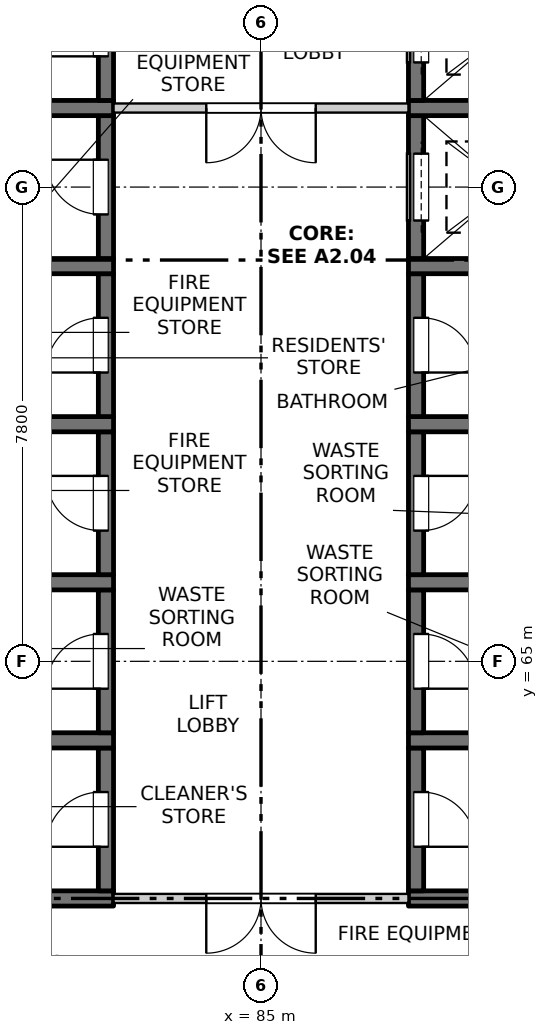
"""IFC4 building model, lengths in metres.
Left out: names, types, materials, properties, quantities, classifications, styles, units other than length and angle.
Written with IfcOpenShell. Run it as: python <this file> out.ifc"""

import sys

from ifc_helpers import new_model, si_unit, direction, frame, frame_2d, origin, place, context, subcontext, project, spatial, rectangle, extrude, element, fill, save


model = new_model("IFC4")
c1 = context("Model", 3, precision=1e-05, world=origin(), true_north=direction((0.0, 1.0)))
c2 = subcontext(c1, "Body", "Model", "MODEL_VIEW")
j1 = project(units=[si_unit("LENGTHUNIT", "METRE"), si_unit("PLANEANGLEUNIT", "RADIAN")], contexts=[c1])
p1 = place(None, origin())
s1 = spatial("IfcSite", under=j1, at=p1, CompositionType="ELEMENT")
p2 = place(p1, origin())
s2 = spatial("IfcBuilding", under=s1, at=p2, CompositionType="ELEMENT")
p3 = place(p2, frame((0.0, 0.0, 221.1)))
s3 = spatial("IfcBuildingStorey", under=s2, at=p3, CompositionType="ELEMENT", Elevation=221.1)
p4 = place(p3, frame((79.575, 61.1, -0.25), z_axis=(0.0, 0.0, 1.0), x_axis=(1.0, 0.0, 0.0)))
e1 = element("IfcWall", 1, at=p4, inside=s3, PredefinedType="SOLIDWALL", context=c2, shape_type="SweptSolid", body=[
    extrude(rectangle(XDim=3.0, YDim=0.25, at=frame_2d((1.5, 0.0))), origin(), (0.0, 0.0, 1.0), 3.4),
])
p5 = place(p3, frame((82.45, 61.225, -0.25), z_axis=(0.0, 0.0, 1.0), x_axis=(0.0, 1.0, 0.0)))
e2 = element("IfcWall", 2, at=p5, inside=s3, PredefinedType="SOLIDWALL", context=c2, shape_type="SweptSolid", body=[
    extrude(rectangle(XDim=2.35, YDim=0.25, at=frame_2d((1.175, 0.0))), origin(), (0.0, 0.0, 1.0), 3.4),
])
p6 = place(p5, frame((0.725, 0.0, 0.25)))
e3 = element("IfcOpeningElement", 3, at=p6, cuts=e2, PredefinedType="OPENING", context=c2, shape_type="SweptSolid", body=[
    extrude(rectangle(XDim=0.9, YDim=2.1, at=frame_2d((0.45, 1.05))), frame((0.0, 0.135, 0.0), z_axis=(0.0, -1.0, 0.0), x_axis=(1.0, 0.0, 0.0)), (0.0, 0.0, 1.0), 0.27),
])
p7 = place(p3, frame((79.575, 63.7, -0.25), z_axis=(0.0, 0.0, 1.0), x_axis=(1.0, 0.0, 0.0)))
e4 = element("IfcWall", 4, at=p7, inside=s3, PredefinedType="SOLIDWALL", context=c2, shape_type="SweptSolid", body=[
    extrude(rectangle(XDim=3.0, YDim=0.25, at=frame_2d((1.5, 0.0))), origin(), (0.0, 0.0, 1.0), 3.4),
])
p8 = place(p3, frame((82.45, 63.825, -0.25), z_axis=(0.0, 0.0, 1.0), x_axis=(0.0, 1.0, 0.0)))
e5 = element("IfcWall", 5, at=p8, inside=s3, PredefinedType="SOLIDWALL", context=c2, shape_type="SweptSolid", body=[
    extrude(rectangle(XDim=2.35, YDim=0.25, at=frame_2d((1.175, 0.0))), origin(), (0.0, 0.0, 1.0), 3.4),
])
p9 = place(p8, frame((0.725, 0.0, 0.25)))
e6 = element("IfcOpeningElement", 6, at=p9, cuts=e5, PredefinedType="OPENING", context=c2, shape_type="SweptSolid", body=[
    extrude(rectangle(XDim=0.9, YDim=2.1, at=frame_2d((0.45, 1.05))), frame((0.0, 0.135, 0.0), z_axis=(0.0, -1.0, 0.0), x_axis=(1.0, 0.0, 0.0)), (0.0, 0.0, 1.0), 0.27),
])
p10 = place(p3, frame((79.575, 66.3, -0.25), z_axis=(0.0, 0.0, 1.0), x_axis=(1.0, 0.0, 0.0)))
e7 = element("IfcWall", 7, at=p10, inside=s3, PredefinedType="SOLIDWALL", context=c2, shape_type="SweptSolid", body=[
    extrude(rectangle(XDim=3.0, YDim=0.25, at=frame_2d((1.5, 0.0))), origin(), (0.0, 0.0, 1.0), 3.4),
])
p11 = place(p3, frame((82.45, 66.425, -0.25), z_axis=(0.0, 0.0, 1.0), x_axis=(0.0, 1.0, 0.0)))
e8 = element("IfcWall", 8, at=p11, inside=s3, PredefinedType="SOLIDWALL", context=c2, shape_type="SweptSolid", body=[
    extrude(rectangle(XDim=2.35, YDim=0.25, at=frame_2d((1.175, 0.0))), origin(), (0.0, 0.0, 1.0), 3.4),
])
p12 = place(p11, frame((0.725, 0.0, 0.25)))
e9 = element("IfcOpeningElement", 9, at=p12, cuts=e8, PredefinedType="OPENING", context=c2, shape_type="SweptSolid", body=[
    extrude(rectangle(XDim=0.9, YDim=2.1, at=frame_2d((0.45, 1.05))), frame((0.0, 0.135, 0.0), z_axis=(0.0, -1.0, 0.0), x_axis=(1.0, 0.0, 0.0)), (0.0, 0.0, 1.0), 0.27),
])
p13 = place(p3, frame((79.575, 68.9, -0.25), z_axis=(0.0, 0.0, 1.0), x_axis=(1.0, 0.0, 0.0)))
e10 = element("IfcWall", 10, at=p13, inside=s3, PredefinedType="SOLIDWALL", context=c2, shape_type="SweptSolid", body=[
    extrude(rectangle(XDim=3.0, YDim=0.25, at=frame_2d((1.5, 0.0))), origin(), (0.0, 0.0, 1.0), 3.4),
])
p14 = place(p3, frame((82.45, 69.025, -0.25), z_axis=(0.0, 0.0, 1.0), x_axis=(0.0, 1.0, 0.0)))
e11 = element("IfcWall", 11, at=p14, inside=s3, PredefinedType="SOLIDWALL", context=c2, shape_type="SweptSolid", body=[
    extrude(rectangle(XDim=2.35, YDim=0.25, at=frame_2d((1.175, 0.0))), origin(), (0.0, 0.0, 1.0), 3.4),
])
p15 = place(p14, frame((0.725, 0.0, 0.25)))
e12 = element("IfcOpeningElement", 12, at=p15, cuts=e11, PredefinedType="OPENING", context=c2, shape_type="SweptSolid", body=[
    extrude(rectangle(XDim=0.9, YDim=2.1, at=frame_2d((0.45, 1.05))), frame((0.0, 0.135, 0.0), z_axis=(0.0, -1.0, 0.0), x_axis=(1.0, 0.0, 0.0)), (0.0, 0.0, 1.0), 0.27),
])
p16 = place(p3, frame((79.575, 71.5, -0.25), z_axis=(0.0, 0.0, 1.0), x_axis=(1.0, 0.0, 0.0)))
e13 = element("IfcWall", 13, at=p16, inside=s3, PredefinedType="SOLIDWALL", context=c2, shape_type="SweptSolid", body=[
    extrude(rectangle(XDim=3.0, YDim=0.25, at=frame_2d((1.5, 0.0))), origin(), (0.0, 0.0, 1.0), 3.4),
])
p17 = place(p3, frame((82.45, 71.625, -0.25), z_axis=(0.0, 0.0, 1.0), x_axis=(0.0, 1.0, 0.0)))
e14 = element("IfcWall", 14, at=p17, inside=s3, PredefinedType="SOLIDWALL", context=c2, shape_type="SweptSolid", body=[
    extrude(rectangle(XDim=2.35, YDim=0.25, at=frame_2d((1.175, 0.0))), origin(), (0.0, 0.0, 1.0), 3.4),
])
p18 = place(p17, frame((0.725, 0.0, 0.25)))
e15 = element("IfcOpeningElement", 15, at=p18, cuts=e14, PredefinedType="OPENING", context=c2, shape_type="SweptSolid", body=[
    extrude(rectangle(XDim=0.9, YDim=2.1, at=frame_2d((0.45, 1.05))), frame((0.0, 0.135, 0.0), z_axis=(0.0, -1.0, 0.0), x_axis=(1.0, 0.0, 0.0)), (0.0, 0.0, 1.0), 0.27),
])
p19 = place(p3, frame((79.575, 74.1, -0.25), z_axis=(0.0, 0.0, 1.0), x_axis=(1.0, 0.0, 0.0)))
e16 = element("IfcWall", 16, at=p19, inside=s3, PredefinedType="SOLIDWALL", context=c2, shape_type="SweptSolid", body=[
    extrude(rectangle(XDim=3.0, YDim=0.25, at=frame_2d((1.5, 0.0))), origin(), (0.0, 0.0, 1.0), 3.4),
])
p20 = place(p3, frame((82.45, 74.225, -0.25), z_axis=(0.0, 0.0, 1.0), x_axis=(0.0, 1.0, 0.0)))
e17 = element("IfcWall", 17, at=p20, inside=s3, PredefinedType="SOLIDWALL", context=c2, shape_type="SweptSolid", body=[
    extrude(rectangle(XDim=2.35, YDim=0.25, at=frame_2d((1.175, 0.0))), origin(), (0.0, 0.0, 1.0), 3.4),
])
p21 = place(p20, frame((0.725, 0.0, 0.25)))
e18 = element("IfcOpeningElement", 18, at=p21, cuts=e17, PredefinedType="OPENING", context=c2, shape_type="SweptSolid", body=[
    extrude(rectangle(XDim=0.9, YDim=2.1, at=frame_2d((0.45, 1.05))), frame((0.0, 0.135, 0.0), z_axis=(0.0, -1.0, 0.0), x_axis=(1.0, 0.0, 0.0)), (0.0, 0.0, 1.0), 0.27),
])
p22 = place(p3, frame((87.425, 61.1, -0.25), z_axis=(0.0, 0.0, 1.0), x_axis=(1.0, 0.0, 0.0)))
e19 = element("IfcWall", 19, at=p22, inside=s3, PredefinedType="SOLIDWALL", context=c2, shape_type="SweptSolid", body=[
    extrude(rectangle(XDim=3.0, YDim=0.25, at=frame_2d((1.5, 0.0))), origin(), (0.0, 0.0, 1.0), 3.4),
])
p23 = place(p3, frame((87.55, 61.225, -0.25), z_axis=(0.0, 0.0, 1.0), x_axis=(0.0, 1.0, 0.0)))
e20 = element("IfcWall", 20, at=p23, inside=s3, PredefinedType="SOLIDWALL", context=c2, shape_type="SweptSolid", body=[
    extrude(rectangle(XDim=2.35, YDim=0.25, at=frame_2d((1.175, 0.0))), origin(), (0.0, 0.0, 1.0), 3.4),
])
p24 = place(p23, frame((0.725, 0.0, 0.25)))
e21 = element("IfcOpeningElement", 21, at=p24, cuts=e20, PredefinedType="OPENING", context=c2, shape_type="SweptSolid", body=[
    extrude(rectangle(XDim=0.9, YDim=2.1, at=frame_2d((0.45, 1.05))), frame((0.0, 0.135, 0.0), z_axis=(0.0, -1.0, 0.0), x_axis=(1.0, 0.0, 0.0)), (0.0, 0.0, 1.0), 0.27),
])
p25 = place(p3, frame((87.425, 63.7, -0.25), z_axis=(0.0, 0.0, 1.0), x_axis=(1.0, 0.0, 0.0)))
e22 = element("IfcWall", 22, at=p25, inside=s3, PredefinedType="SOLIDWALL", context=c2, shape_type="SweptSolid", body=[
    extrude(rectangle(XDim=3.0, YDim=0.25, at=frame_2d((1.5, 0.0))), origin(), (0.0, 0.0, 1.0), 3.4),
])
p26 = place(p3, frame((87.55, 63.825, -0.25), z_axis=(0.0, 0.0, 1.0), x_axis=(0.0, 1.0, 0.0)))
e23 = element("IfcWall", 23, at=p26, inside=s3, PredefinedType="SOLIDWALL", context=c2, shape_type="SweptSolid", body=[
    extrude(rectangle(XDim=2.35, YDim=0.25, at=frame_2d((1.175, 0.0))), origin(), (0.0, 0.0, 1.0), 3.4),
])
p27 = place(p26, frame((0.725, 0.0, 0.25)))
e24 = element("IfcOpeningElement", 24, at=p27, cuts=e23, PredefinedType="OPENING", context=c2, shape_type="SweptSolid", body=[
    extrude(rectangle(XDim=0.9, YDim=2.1, at=frame_2d((0.45, 1.05))), frame((0.0, 0.135, 0.0), z_axis=(0.0, -1.0, 0.0), x_axis=(1.0, 0.0, 0.0)), (0.0, 0.0, 1.0), 0.27),
])
p28 = place(p3, frame((87.425, 66.3, -0.25), z_axis=(0.0, 0.0, 1.0), x_axis=(1.0, 0.0, 0.0)))
e25 = element("IfcWall", 25, at=p28, inside=s3, PredefinedType="SOLIDWALL", context=c2, shape_type="SweptSolid", body=[
    extrude(rectangle(XDim=3.0, YDim=0.25, at=frame_2d((1.5, 0.0))), origin(), (0.0, 0.0, 1.0), 3.4),
])
p29 = place(p3, frame((87.55, 66.425, -0.25), z_axis=(0.0, 0.0, 1.0), x_axis=(0.0, 1.0, 0.0)))
e26 = element("IfcWall", 26, at=p29, inside=s3, PredefinedType="SOLIDWALL", context=c2, shape_type="SweptSolid", body=[
    extrude(rectangle(XDim=2.35, YDim=0.25, at=frame_2d((1.175, 0.0))), origin(), (0.0, 0.0, 1.0), 3.4),
])
p30 = place(p29, frame((0.725, 0.0, 0.25)))
e27 = element("IfcOpeningElement", 27, at=p30, cuts=e26, PredefinedType="OPENING", context=c2, shape_type="SweptSolid", body=[
    extrude(rectangle(XDim=0.9, YDim=2.1, at=frame_2d((0.45, 1.05))), frame((0.0, 0.135, 0.0), z_axis=(0.0, -1.0, 0.0), x_axis=(1.0, 0.0, 0.0)), (0.0, 0.0, 1.0), 0.27),
])
p31 = place(p3, frame((87.425, 68.9, -0.25), z_axis=(0.0, 0.0, 1.0), x_axis=(1.0, 0.0, 0.0)))
e28 = element("IfcWall", 28, at=p31, inside=s3, PredefinedType="SOLIDWALL", context=c2, shape_type="SweptSolid", body=[
    extrude(rectangle(XDim=3.0, YDim=0.25, at=frame_2d((1.5, 0.0))), origin(), (0.0, 0.0, 1.0), 3.4),
])
p32 = place(p3, frame((87.55, 69.025, -0.25), z_axis=(0.0, 0.0, 1.0), x_axis=(0.0, 1.0, 0.0)))
e29 = element("IfcWall", 29, at=p32, inside=s3, PredefinedType="SOLIDWALL", context=c2, shape_type="SweptSolid", body=[
    extrude(rectangle(XDim=2.35, YDim=0.25, at=frame_2d((1.175, 0.0))), origin(), (0.0, 0.0, 1.0), 3.4),
])
p33 = place(p32, frame((0.725, 0.0, 0.25)))
e30 = element("IfcOpeningElement", 30, at=p33, cuts=e29, PredefinedType="OPENING", context=c2, shape_type="SweptSolid", body=[
    extrude(rectangle(XDim=0.9, YDim=2.1, at=frame_2d((0.45, 1.05))), frame((0.0, 0.135, 0.0), z_axis=(0.0, -1.0, 0.0), x_axis=(1.0, 0.0, 0.0)), (0.0, 0.0, 1.0), 0.27),
])
p34 = place(p3, frame((87.425, 71.5, -0.25), z_axis=(0.0, 0.0, 1.0), x_axis=(1.0, 0.0, 0.0)))
e31 = element("IfcWall", 31, at=p34, inside=s3, PredefinedType="SOLIDWALL", context=c2, shape_type="SweptSolid", body=[
    extrude(rectangle(XDim=3.0, YDim=0.25, at=frame_2d((1.5, 0.0))), origin(), (0.0, 0.0, 1.0), 3.4),
])
p35 = place(p3, frame((87.55, 71.625, -0.25), z_axis=(0.0, 0.0, 1.0), x_axis=(0.0, 1.0, 0.0)))
e32 = element("IfcWall", 32, at=p35, inside=s3, PredefinedType="SOLIDWALL", context=c2, shape_type="SweptSolid", body=[
    extrude(rectangle(XDim=2.35, YDim=0.25, at=frame_2d((1.175, 0.0))), origin(), (0.0, 0.0, 1.0), 3.4),
])
p36 = place(p35, frame((0.625, 0.0, 0.25)))
e33 = element("IfcOpeningElement", 33, at=p36, cuts=e32, PredefinedType="OPENING", context=c2, shape_type="SweptSolid", body=[
    extrude(rectangle(XDim=1.1, YDim=2.1, at=frame_2d((0.55, 1.05))), frame((0.0, 0.135, 0.0), z_axis=(0.0, -1.0, 0.0), x_axis=(1.0, 0.0, 0.0)), (0.0, 0.0, 1.0), 0.27),
])
p37 = place(p3, frame((87.425, 74.1, -0.25), z_axis=(0.0, 0.0, 1.0), x_axis=(1.0, 0.0, 0.0)))
e34 = element("IfcWall", 34, at=p37, inside=s3, PredefinedType="SOLIDWALL", context=c2, shape_type="SweptSolid", body=[
    extrude(rectangle(XDim=3.0, YDim=0.25, at=frame_2d((1.5, 0.0))), origin(), (0.0, 0.0, 1.0), 3.4),
])
p38 = place(p3, frame((87.55, 74.225, -0.25), z_axis=(0.0, 0.0, 1.0), x_axis=(0.0, 1.0, 0.0)))
e35 = element("IfcWall", 35, at=p38, inside=s3, PredefinedType="SOLIDWALL", context=c2, shape_type="SweptSolid", body=[
    extrude(rectangle(XDim=2.35, YDim=0.25, at=frame_2d((1.175, 0.0))), origin(), (0.0, 0.0, 1.0), 3.4),
])
p39 = place(p38, frame((0.625, 0.0, 0.25)))
e36 = element("IfcOpeningElement", 36, at=p39, cuts=e35, PredefinedType="OPENING", context=c2, shape_type="SweptSolid", body=[
    extrude(rectangle(XDim=1.1, YDim=2.1, at=frame_2d((0.55, 1.05))), frame((0.0, 0.135, 0.0), z_axis=(0.0, -1.0, 0.0), x_axis=(1.0, 0.0, 0.0)), (0.0, 0.0, 1.0), 0.27),
])
p40 = place(p3, frame((82.575, 61.1, 0.0), z_axis=(0.0, 0.0, 1.0), x_axis=(1.0, 0.0, 0.0)))
e37 = element("IfcWall", 37, at=p40, inside=s3, PredefinedType="PARTITIONING", context=c2, shape_type="SweptSolid", body=[
    extrude(rectangle(XDim=4.85, YDim=0.15, at=frame_2d((2.425, 0.0))), origin(), (0.0, 0.0, 1.0), 3.15),
])
p41 = place(p40, frame((1.525, 0.0, 0.0)))
e38 = element("IfcOpeningElement", 38, at=p41, cuts=e37, PredefinedType="OPENING", context=c2, shape_type="SweptSolid", body=[
    extrude(rectangle(XDim=1.8, YDim=2.1, at=frame_2d((0.9, 1.05))), frame((0.0, 0.085, 0.0), z_axis=(0.0, -1.0, 0.0), x_axis=(1.0, 0.0, 0.0)), (0.0, 0.0, 1.0), 0.17),
])
p42 = place(p3, frame((82.575, 74.1, 0.0), z_axis=(0.0, 0.0, 1.0), x_axis=(1.0, 0.0, 0.0)))
e39 = element("IfcWall", 39, at=p42, inside=s3, PredefinedType="PARTITIONING", context=c2, shape_type="SweptSolid", body=[
    extrude(rectangle(XDim=4.85, YDim=0.15, at=frame_2d((2.425, 0.0))), origin(), (0.0, 0.0, 1.0), 3.15),
])
p43 = place(p42, frame((1.525, 0.0, 0.0)))
e40 = element("IfcOpeningElement", 40, at=p43, cuts=e39, PredefinedType="OPENING", context=c2, shape_type="SweptSolid", body=[
    extrude(rectangle(XDim=1.8, YDim=2.1, at=frame_2d((0.9, 1.05))), frame((0.0, 0.085, 0.0), z_axis=(0.0, -1.0, 0.0), x_axis=(1.0, 0.0, 0.0)), (0.0, 0.0, 1.0), 0.17),
])
p44 = place(p41, origin())
e41 = element("IfcDoor", 41, at=p44, inside=s3, OperationType="DOUBLE_DOOR_SINGLE_SWING", PredefinedType="DOOR", context=c2, shape_type="SweptSolid", body=[
    extrude(rectangle(XDim=1.8, YDim=2.1, at=frame_2d((0.9, 1.05))), frame((0.0, 0.025, 0.0), z_axis=(0.0, -1.0, 0.0), x_axis=(1.0, 0.0, 0.0)), (0.0, 0.0, 1.0), 0.05),
])
fill(e38, e41)
p45 = place(p6, origin())
e42 = element("IfcDoor", 42, at=p45, inside=s3, OperationType="SINGLE_SWING_LEFT", PredefinedType="DOOR", context=c2, shape_type="SweptSolid", body=[
    extrude(rectangle(XDim=0.9, YDim=2.1, at=frame_2d((0.45, 1.05))), frame((0.0, 0.11, 0.0), z_axis=(0.0, -1.0, 0.0), x_axis=(1.0, 0.0, 0.0)), (0.0, 0.0, 1.0), 0.05),
])
fill(e3, e42)
p46 = place(p24, origin())
e43 = element("IfcDoor", 43, at=p46, inside=s3, OperationType="SINGLE_SWING_RIGHT", PredefinedType="DOOR", context=c2, shape_type="SweptSolid", body=[
    extrude(rectangle(XDim=0.9, YDim=2.1, at=frame_2d((0.45, 1.05))), frame((0.0, -0.06, 0.0), z_axis=(0.0, -1.0, 0.0), x_axis=(1.0, 0.0, 0.0)), (0.0, 0.0, 1.0), 0.05),
])
fill(e21, e43)
p47 = place(p9, origin())
e44 = element("IfcDoor", 44, at=p47, inside=s3, OperationType="SINGLE_SWING_LEFT", PredefinedType="DOOR", context=c2, shape_type="SweptSolid", body=[
    extrude(rectangle(XDim=0.9, YDim=2.1, at=frame_2d((0.45, 1.05))), frame((0.0, 0.11, 0.0), z_axis=(0.0, -1.0, 0.0), x_axis=(1.0, 0.0, 0.0)), (0.0, 0.0, 1.0), 0.05),
])
fill(e6, e44)
p48 = place(p27, origin())
e45 = element("IfcDoor", 45, at=p48, inside=s3, OperationType="SINGLE_SWING_RIGHT", PredefinedType="DOOR", context=c2, shape_type="SweptSolid", body=[
    extrude(rectangle(XDim=0.9, YDim=2.1, at=frame_2d((0.45, 1.05))), frame((0.0, -0.06, 0.0), z_axis=(0.0, -1.0, 0.0), x_axis=(1.0, 0.0, 0.0)), (0.0, 0.0, 1.0), 0.05),
])
fill(e24, e45)
p49 = place(p12, origin())
e46 = element("IfcDoor", 46, at=p49, inside=s3, OperationType="SINGLE_SWING_RIGHT", PredefinedType="DOOR", context=c2, shape_type="SweptSolid", body=[
    extrude(rectangle(XDim=0.9, YDim=2.1, at=frame_2d((0.45, 1.05))), frame((0.0, 0.11, 0.0), z_axis=(0.0, -1.0, 0.0), x_axis=(1.0, 0.0, 0.0)), (0.0, 0.0, 1.0), 0.05),
])
fill(e9, e46)
p50 = place(p30, origin())
e47 = element("IfcDoor", 47, at=p50, inside=s3, OperationType="SINGLE_SWING_LEFT", PredefinedType="DOOR", context=c2, shape_type="SweptSolid", body=[
    extrude(rectangle(XDim=0.9, YDim=2.1, at=frame_2d((0.45, 1.05))), frame((0.0, -0.06, 0.0), z_axis=(0.0, -1.0, 0.0), x_axis=(1.0, 0.0, 0.0)), (0.0, 0.0, 1.0), 0.05),
])
fill(e27, e47)
p51 = place(p15, origin())
e48 = element("IfcDoor", 48, at=p51, inside=s3, OperationType="SINGLE_SWING_LEFT", PredefinedType="DOOR", context=c2, shape_type="SweptSolid", body=[
    extrude(rectangle(XDim=0.9, YDim=2.1, at=frame_2d((0.45, 1.05))), frame((0.0, 0.11, 0.0), z_axis=(0.0, -1.0, 0.0), x_axis=(1.0, 0.0, 0.0)), (0.0, 0.0, 1.0), 0.05),
])
fill(e12, e48)
p52 = place(p33, origin())
e49 = element("IfcDoor", 49, at=p52, inside=s3, OperationType="SINGLE_SWING_RIGHT", PredefinedType="DOOR", context=c2, shape_type="SweptSolid", body=[
    extrude(rectangle(XDim=0.9, YDim=2.1, at=frame_2d((0.45, 1.05))), frame((0.0, -0.06, 0.0), z_axis=(0.0, -1.0, 0.0), x_axis=(1.0, 0.0, 0.0)), (0.0, 0.0, 1.0), 0.05),
])
fill(e30, e49)
p53 = place(p18, origin())
e50 = element("IfcDoor", 50, at=p53, inside=s3, OperationType="SINGLE_SWING_RIGHT", PredefinedType="DOOR", context=c2, shape_type="SweptSolid", body=[
    extrude(rectangle(XDim=0.9, YDim=2.1, at=frame_2d((0.45, 1.05))), frame((0.0, 0.11, 0.0), z_axis=(0.0, -1.0, 0.0), x_axis=(1.0, 0.0, 0.0)), (0.0, 0.0, 1.0), 0.05),
])
fill(e15, e50)
p54 = place(p36, origin())
e51 = element("IfcDoor", 51, at=p54, inside=s3, OperationType="SLIDING_TO_LEFT", PredefinedType="DOOR", context=c2, shape_type="SweptSolid", body=[
    extrude(rectangle(XDim=1.1, YDim=2.1, at=frame_2d((0.55, 1.05))), frame((0.0, -0.06, 0.0), z_axis=(0.0, -1.0, 0.0), x_axis=(1.0, 0.0, 0.0)), (0.0, 0.0, 1.0), 0.05),
])
fill(e33, e51)
p55 = place(p43, origin())
e52 = element("IfcDoor", 52, at=p55, inside=s3, OperationType="DOUBLE_DOOR_SINGLE_SWING", PredefinedType="DOOR", context=c2, shape_type="SweptSolid", body=[
    extrude(rectangle(XDim=1.8, YDim=2.1, at=frame_2d((0.9, 1.05))), frame((0.0, 0.025, 0.0), z_axis=(0.0, -1.0, 0.0), x_axis=(1.0, 0.0, 0.0)), (0.0, 0.0, 1.0), 0.05),
])
fill(e40, e52)
p56 = place(p21, origin())
e53 = element("IfcDoor", 53, at=p56, inside=s3, OperationType="SINGLE_SWING_LEFT", PredefinedType="DOOR", context=c2, shape_type="SweptSolid", body=[
    extrude(rectangle(XDim=0.9, YDim=2.1, at=frame_2d((0.45, 1.05))), frame((0.0, 0.11, 0.0), z_axis=(0.0, -1.0, 0.0), x_axis=(1.0, 0.0, 0.0)), (0.0, 0.0, 1.0), 0.05),
])
fill(e18, e53)
p57 = place(p39, origin())
e54 = element("IfcDoor", 54, at=p57, inside=s3, OperationType="SLIDING_TO_LEFT", PredefinedType="DOOR", context=c2, shape_type="SweptSolid", body=[
    extrude(rectangle(XDim=1.1, YDim=2.1, at=frame_2d((0.55, 1.05))), frame((0.0, -0.06, 0.0), z_axis=(0.0, -1.0, 0.0), x_axis=(1.0, 0.0, 0.0)), (0.0, 0.0, 1.0), 0.05),
])
fill(e36, e54)
save(model, sys.argv[1])
